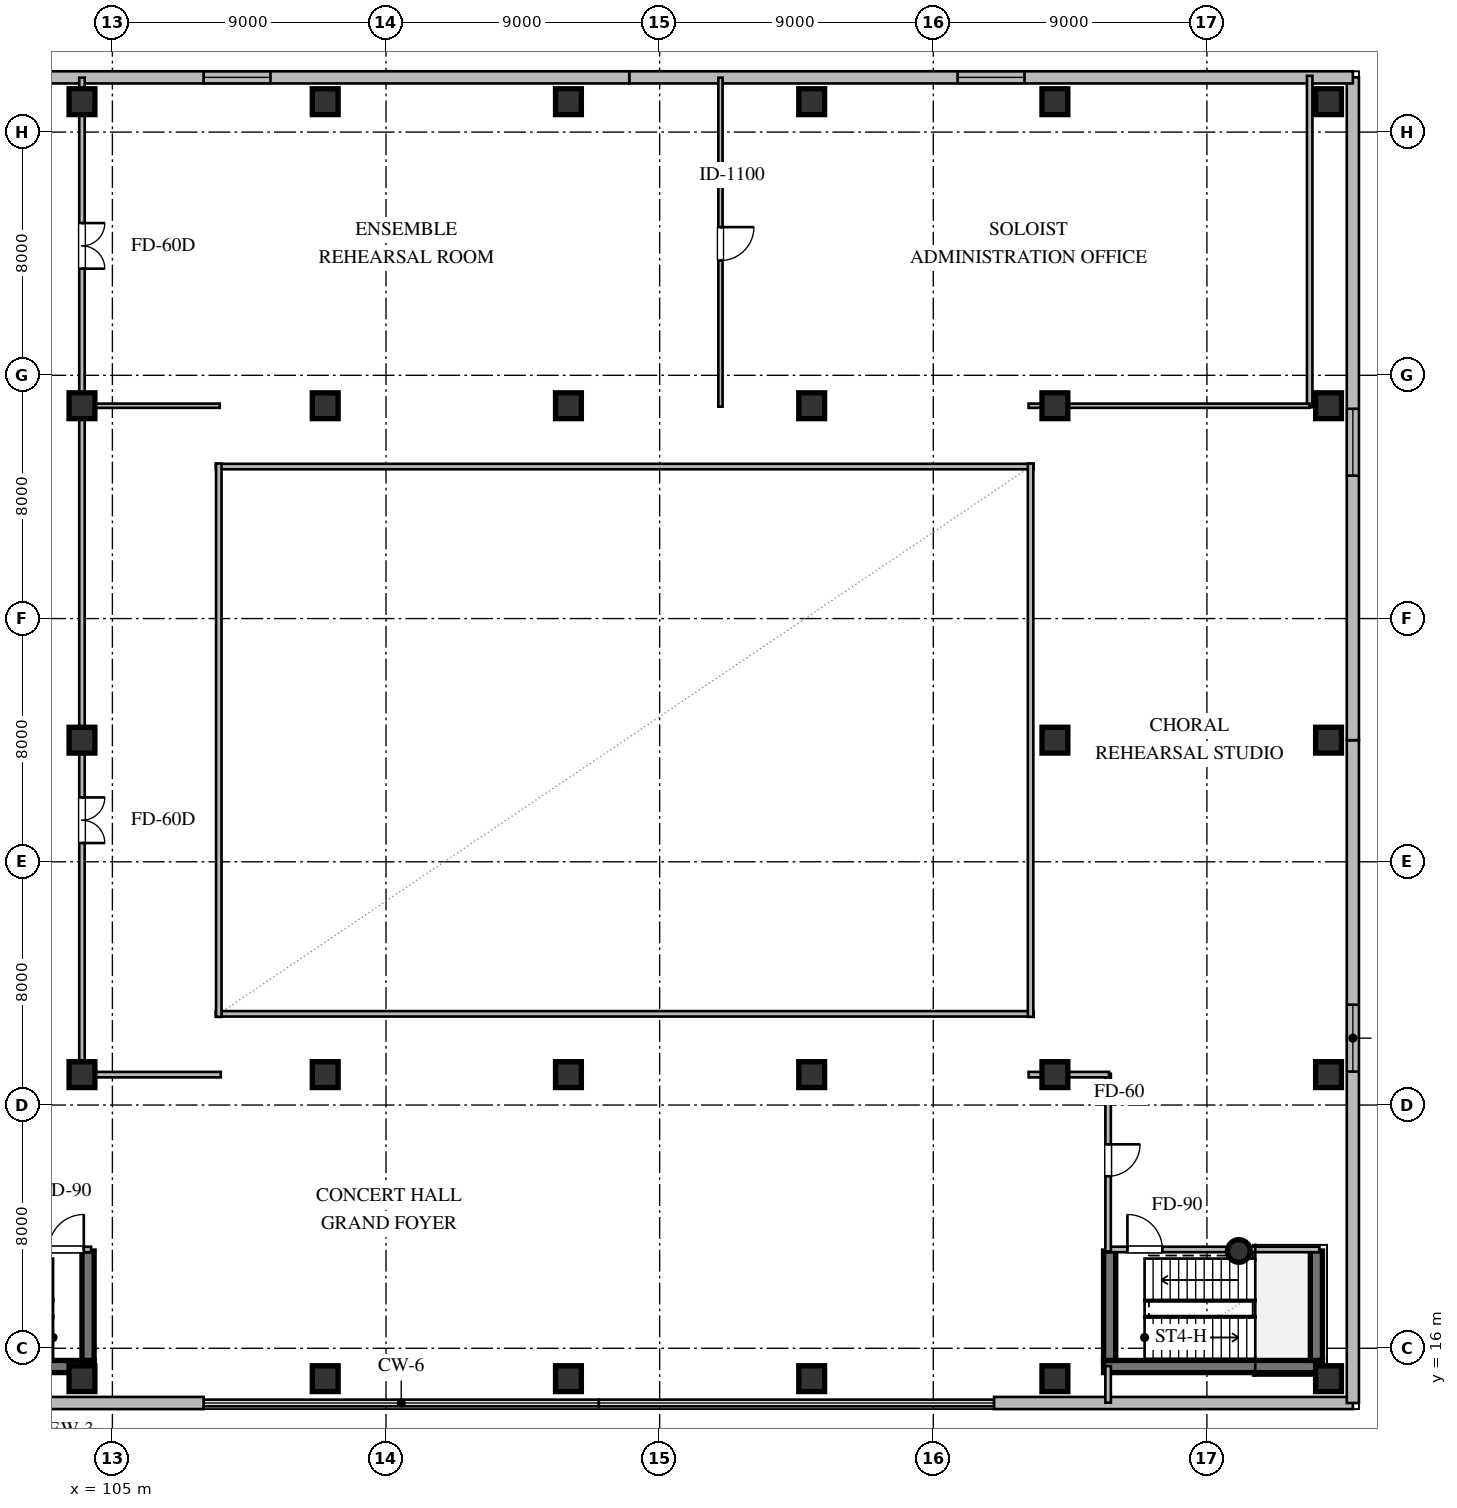
"""IFC4 building model, lengths in metres.
Left out: names, types, materials, properties, quantities, classifications, styles, units other than length and angle.
Written with IfcOpenShell. Run it as: python <this file> out.ifc"""

import sys

from ifc_helpers import new_model, si_unit, direction, frame, frame_2d, origin, origin_2d, place, context, subcontext, project, spatial, rectangle, circle, extrude, element, fill, save


model = new_model("IFC4")
c1 = context("Model", 3, precision=1e-05, world=origin(), true_north=direction((0.0, 1.0)))
c2 = subcontext(c1, "Body", "Model", "MODEL_VIEW")
j1 = project(units=[si_unit("LENGTHUNIT", "METRE"), si_unit("PLANEANGLEUNIT", "RADIAN")], contexts=[c1])
p1 = place(None, origin())
s1 = spatial("IfcSite", under=j1, at=p1, CompositionType="ELEMENT")
p2 = place(p1, origin())
s2 = spatial("IfcBuilding", under=s1, at=p2, CompositionType="ELEMENT")
p3 = place(p2, frame((0.0, 0.0, 4.8)))
s3 = spatial("IfcBuildingStorey", under=s2, at=p3, CompositionType="ELEMENT", Elevation=4.8)
for number, where, z_axis, x_axis in (
    (1, (104.0, 15.0, 0.0), (0.0, 0.0, 1.0), (1.0, 0.0, 0.0)),
    (2, (104.0, 25.0, 0.0), (0.0, 0.0, 1.0), (1.0, 0.0, 0.0)),
    (3, (104.0, 36.0, 0.0), (0.0, 0.0, 1.0), (1.0, 0.0, 0.0)),
    (4, (104.0, 47.0, 0.0), (0.0, 0.0, 1.0), (1.0, 0.0, 0.0)),
    (5, (104.0, 57.0, 0.0), (0.0, 0.0, 1.0), (1.0, 0.0, 0.0)),
    (6, (112.0, 15.0, 0.0), (0.0, 0.0, 1.0), (1.0, 0.0, 0.0)),
    (7, (112.0, 25.0, 0.0), (0.0, 0.0, 1.0), (1.0, 0.0, 0.0)),
    (8, (112.0, 47.0, 0.0), (0.0, 0.0, 1.0), (1.0, 0.0, 0.0)),
    (9, (112.0, 57.0, 0.0), (0.0, 0.0, 1.0), (1.0, 0.0, 0.0)),
    (10, (120.0, 15.0, 0.0), (0.0, 0.0, 1.0), (1.0, 0.0, 0.0)),
    (11, (120.0, 25.0, 0.0), (0.0, 0.0, 1.0), (1.0, 0.0, 0.0)),
    (12, (120.0, 47.0, 0.0), (0.0, 0.0, 1.0), (1.0, 0.0, 0.0)),
    (13, (120.0, 57.0, 0.0), (0.0, 0.0, 1.0), (1.0, 0.0, 0.0)),
    (14, (128.0, 15.0, 0.0), (0.0, 0.0, 1.0), (1.0, 0.0, 0.0)),
    (15, (128.0, 25.0, 0.0), (0.0, 0.0, 1.0), (1.0, 0.0, 0.0)),
    (16, (128.0, 47.0, 0.0), (0.0, 0.0, 1.0), (1.0, 0.0, 0.0)),
    (17, (128.0, 57.0, 0.0), (0.0, 0.0, 1.0), (1.0, 0.0, 0.0)),
    (18, (136.0, 15.0, 0.0), (0.0, 0.0, 1.0), (1.0, 0.0, 0.0)),
    (19, (136.0, 25.0, 0.0), (0.0, 0.0, 1.0), (1.0, 0.0, 0.0)),
    (20, (136.0, 36.0, 0.0), (0.0, 0.0, 1.0), (1.0, 0.0, 0.0)),
    (21, (136.0, 47.0, 0.0), (0.0, 0.0, 1.0), (1.0, 0.0, 0.0)),
    (22, (136.0, 57.0, 0.0), (0.0, 0.0, 1.0), (1.0, 0.0, 0.0)),
    (23, (145.0, 15.0, 0.0), (0.0, 0.0, 1.0), (1.0, 0.0, 0.0)),
    (24, (145.0, 25.0, 0.0), (0.0, 0.0, 1.0), (1.0, 0.0, 0.0)),
    (25, (145.0, 36.0, 0.0), (0.0, 0.0, 1.0), (1.0, 0.0, 0.0)),
    (26, (145.0, 47.0, 0.0), (0.0, 0.0, 1.0), (1.0, 0.0, 0.0)),
    (27, (145.0, 57.0, 0.0), (0.0, 0.0, 1.0), (1.0, 0.0, 0.0)),
):
    element("IfcColumn", number, at=place(p3, frame(where, z_axis=z_axis, x_axis=x_axis)), inside=s3, PredefinedType="COLUMN", context=c2, shape_type="SweptSolid", body=[
        extrude(rectangle(XDim=0.85, YDim=0.85, at=origin_2d()), origin(), (0.0, 0.0, 1.0), 4.8),
    ])
p4 = place(p3, frame((97.2, 15.4, 0.0), z_axis=(0.0, 0.0, 1.0), x_axis=(1.0, 0.0, 0.0)))
e28 = element("IfcWall", 28, at=p4, inside=s3, PredefinedType="SHEAR", context=c2, shape_type="SweptSolid", body=[
    extrude(rectangle(XDim=7.2, YDim=0.4, at=frame_2d((3.6, 0.0))), origin(), (0.0, 0.0, 1.0), 4.52),
])
p5 = place(p3, frame((104.2, 15.6, 0.0), z_axis=(0.0, 0.0, 1.0), x_axis=(0.0, 1.0, 0.0)))
e29 = element("IfcWall", 29, at=p5, inside=s3, PredefinedType="SHEAR", context=c2, shape_type="SweptSolid", body=[
    extrude(rectangle(XDim=3.6, YDim=0.4, at=frame_2d((1.8, 0.0))), origin(), (0.0, 0.0, 1.0), 4.52),
])
p6 = place(p3, frame((137.6, 15.4, 0.0), z_axis=(0.0, 0.0, 1.0), x_axis=(1.0, 0.0, 0.0)))
e30 = element("IfcWall", 30, at=p6, inside=s3, PredefinedType="SHEAR", context=c2, shape_type="SweptSolid", body=[
    extrude(rectangle(XDim=7.2, YDim=0.4, at=frame_2d((3.6, 0.0))), origin(), (0.0, 0.0, 1.0), 4.52),
])
for number, where, z_axis, x_axis in (
    (31, (137.8, 15.6, 0.0), (0.0, 0.0, 1.0), (0.0, 1.0, 0.0)),
    (32, (144.6, 15.6, 0.0), (0.0, 0.0, 1.0), (0.0, 1.0, 0.0)),
):
    element("IfcWall", number, at=place(p3, frame(where, z_axis=z_axis, x_axis=x_axis)), inside=s3, PredefinedType="SHEAR", context=c2, shape_type="SweptSolid", body=[
        extrude(rectangle(XDim=3.6, YDim=0.4, at=frame_2d((1.8, 0.0))), origin(), (0.0, 0.0, 1.0), 4.52),
    ])
p7 = place(p3, frame((142.05, 19.2, 0.0), z_axis=(0.0, 0.0, 1.0), x_axis=(1.0, 0.0, 0.0)))
e33 = element("IfcColumn", 33, at=p7, inside=s3, PredefinedType="COLUMN", context=c2, shape_type="SweptSolid", body=[
    extrude(circle(Radius=0.375, at=origin_2d()), origin(), (0.0, 0.0, 1.0), 4.8),
])
for number, where, z_axis, x_axis in (
    (34, (96.2, 14.2, 0.0), (0.0, 0.0, 1.0), (1.0, 0.0, 0.0)),
    (35, (134.0, 14.2, 0.0), (0.0, 0.0, 1.0), (1.0, 0.0, 0.0)),
):
    element("IfcWall", number, at=place(p3, frame(where, z_axis=z_axis, x_axis=x_axis)), inside=s3, PredefinedType="STANDARD", context=c2, shape_type="SweptSolid", body=[
        extrude(rectangle(XDim=11.8, YDim=0.4, at=frame_2d((5.9, 0.0))), origin(), (0.0, 0.0, 1.0), 4.52),
    ])
p8 = place(p3, frame((145.8, 14.2, 0.0), z_axis=(0.0, 0.0, 1.0), x_axis=(0.0, 1.0, 0.0)))
e36 = element("IfcWall", 36, at=p8, inside=s3, PredefinedType="STANDARD", context=c2, shape_type="SweptSolid", body=[
    extrude(rectangle(XDim=21.8, YDim=0.4, at=frame_2d((10.9, 0.0))), origin(), (0.0, 0.0, 1.0), 4.52),
])
p9 = place(p8, frame((10.9, 0.0, 1.25)))
e37 = element("IfcOpeningElement", 37, at=p9, cuts=e36, PredefinedType="OPENING", context=c2, shape_type="SweptSolid", body=[
    extrude(rectangle(XDim=2.2, YDim=1.5, at=frame_2d((1.1, 0.75))), frame((0.0, 0.21, 0.0), z_axis=(0.0, -1.0, 0.0), x_axis=(1.0, 0.0, 0.0)), (0.0, 0.0, 1.0), 0.42),
])
p10 = place(p3, frame((145.8, 36.0, 0.0), z_axis=(0.0, 0.0, 1.0), x_axis=(0.0, 1.0, 0.0)))
e38 = element("IfcWall", 38, at=p10, inside=s3, PredefinedType="STANDARD", context=c2, shape_type="SweptSolid", body=[
    extrude(rectangle(XDim=21.8, YDim=0.4, at=frame_2d((10.9, 0.0))), origin(), (0.0, 0.0, 1.0), 4.52),
])
p11 = place(p10, frame((8.7, 0.0, 1.25)))
e39 = element("IfcOpeningElement", 39, at=p11, cuts=e38, PredefinedType="OPENING", context=c2, shape_type="SweptSolid", body=[
    extrude(rectangle(XDim=2.2, YDim=1.5, at=frame_2d((1.1, 0.75))), frame((0.0, 0.21, 0.0), z_axis=(0.0, -1.0, 0.0), x_axis=(1.0, 0.0, 0.0)), (0.0, 0.0, 1.0), 0.42),
])
p12 = place(p3, frame((145.8, 57.8, 0.0), z_axis=(0.0, 0.0, 1.0), x_axis=(-1.0, 0.0, 0.0)))
e40 = element("IfcWall", 40, at=p12, inside=s3, PredefinedType="STANDARD", context=c2, shape_type="SweptSolid", body=[
    extrude(rectangle(XDim=23.8, YDim=0.4, at=frame_2d((11.9, 0.0))), origin(), (0.0, 0.0, 1.0), 4.52),
])
p13 = place(p12, frame((10.8, 0.0, 1.25)))
e41 = element("IfcOpeningElement", 41, at=p13, cuts=e40, PredefinedType="OPENING", context=c2, shape_type="SweptSolid", body=[
    extrude(rectangle(XDim=2.2, YDim=1.5, at=frame_2d((1.1, 0.75))), frame((0.0, 0.21, 0.0), z_axis=(0.0, -1.0, 0.0), x_axis=(1.0, 0.0, 0.0)), (0.0, 0.0, 1.0), 0.42),
])
p14 = place(p3, frame((122.0, 57.8, 0.0), z_axis=(0.0, 0.0, 1.0), x_axis=(-1.0, 0.0, 0.0)))
e42 = element("IfcWall", 42, at=p14, inside=s3, PredefinedType="STANDARD", context=c2, shape_type="SweptSolid", body=[
    extrude(rectangle(XDim=25.8, YDim=0.4, at=frame_2d((12.9, 0.0))), origin(), (0.0, 0.0, 1.0), 4.52),
])
p15 = place(p14, frame((11.8, 0.0, 1.25)))
e43 = element("IfcOpeningElement", 43, at=p15, cuts=e42, PredefinedType="OPENING", context=c2, shape_type="SweptSolid", body=[
    extrude(rectangle(XDim=2.2, YDim=1.5, at=frame_2d((1.1, 0.75))), frame((0.0, 0.21, 0.0), z_axis=(0.0, -1.0, 0.0), x_axis=(1.0, 0.0, 0.0)), (0.0, 0.0, 1.0), 0.42),
])
p16 = place(p3, frame((97.3, 19.25, 0.0), z_axis=(0.0, 0.0, 1.0), x_axis=(1.0, 0.0, 0.0)))
e44 = element("IfcWall", 44, at=p16, inside=s3, PredefinedType="PARTITIONING", context=c2, shape_type="SweptSolid", body=[
    extrude(rectangle(XDim=7.0, YDim=0.18, at=frame_2d((3.5, 0.0))), origin(), (0.0, 0.0, 1.0), 4.52),
])
p17 = place(p16, frame((5.61, 0.0, 0.0)))
e45 = element("IfcOpeningElement", 45, at=p17, cuts=e44, PredefinedType="OPENING", context=c2, shape_type="SweptSolid", body=[
    extrude(rectangle(XDim=1.15, YDim=2.1, at=frame_2d((0.575, 1.05))), frame((0.0, 0.1, 0.0), z_axis=(0.0, -1.0, 0.0), x_axis=(1.0, 0.0, 0.0)), (0.0, 0.0, 1.0), 0.2),
])
p18 = place(p3, frame((137.7, 19.25, 0.0), z_axis=(0.0, 0.0, 1.0), x_axis=(1.0, 0.0, 0.0)))
e46 = element("IfcWall", 46, at=p18, inside=s3, PredefinedType="PARTITIONING", context=c2, shape_type="SweptSolid", body=[
    extrude(rectangle(XDim=7.0, YDim=0.18, at=frame_2d((3.5, 0.0))), origin(), (0.0, 0.0, 1.0), 4.52),
])
p19 = place(p18, frame((0.685, 0.0, 0.0)))
e47 = element("IfcOpeningElement", 47, at=p19, cuts=e46, PredefinedType="OPENING", context=c2, shape_type="SweptSolid", body=[
    extrude(rectangle(XDim=1.15, YDim=2.1, at=frame_2d((0.575, 1.05))), frame((0.0, 0.1, 0.0), z_axis=(0.0, -1.0, 0.0), x_axis=(1.0, 0.0, 0.0)), (0.0, 0.0, 1.0), 0.2),
])
for number, where, z_axis, x_axis in (
    (48, (108.4, 27.0, 0.0), (0.0, 0.0, 1.0), (1.0, 0.0, 0.0)),
    (49, (108.4, 45.0, 0.0), (0.0, 0.0, 1.0), (1.0, 0.0, 0.0)),
):
    element("IfcWall", number, at=place(p3, frame(where, z_axis=z_axis, x_axis=x_axis)), inside=s3, PredefinedType="PARTITIONING", context=c2, shape_type="SweptSolid", body=[
        extrude(rectangle(XDim=26.9, YDim=0.18, at=frame_2d((13.45, 0.0))), origin(), (0.0, 0.0, 1.0), 4.52),
    ])
for number, where, z_axis, x_axis in (
    (50, (108.5, 26.9, 0.0), (0.0, 0.0, 1.0), (0.0, 1.0, 0.0)),
    (51, (135.2, 26.9, 0.0), (0.0, 0.0, 1.0), (0.0, 1.0, 0.0)),
):
    element("IfcWall", number, at=place(p3, frame(where, z_axis=z_axis, x_axis=x_axis)), inside=s3, PredefinedType="PARTITIONING", context=c2, shape_type="SweptSolid", body=[
        extrude(rectangle(XDim=18.2, YDim=0.18, at=frame_2d((9.1, 0.0))), origin(), (0.0, 0.0, 1.0), 4.52),
    ])
p20 = place(p3, frame((144.38, 46.95, 0.0), z_axis=(0.0, 0.0, 1.0), x_axis=(0.0, 1.0, 0.0)))
e52 = element("IfcWall", 52, at=p20, inside=s3, PredefinedType="PARTITIONING", context=c2, shape_type="SweptSolid", body=[
    extrude(rectangle(XDim=10.9, YDim=0.18, at=frame_2d((5.45, 0.0))), origin(), (0.0, 0.0, 1.0), 4.093),
])
p21 = place(p3, frame((104.0, 47.065, 0.0), z_axis=(0.0, 0.0, 1.0), x_axis=(0.0, -1.0, 0.0)))
e53 = element("IfcWall", 53, at=p21, inside=s3, PredefinedType="PARTITIONING", context=c2, shape_type="SweptSolid", body=[
    extrude(rectangle(XDim=22.095, YDim=0.18, at=frame_2d((11.047, 0.0))), origin(), (0.0, 0.0, 1.0), 4.093),
])
p22 = place(p21, frame((12.948, 0.0, 0.0)))
e54 = element("IfcOpeningElement", 54, at=p22, cuts=e53, PredefinedType="OPENING", context=c2, shape_type="SweptSolid", body=[
    extrude(rectangle(XDim=1.5, YDim=2.15, at=frame_2d((0.75, 1.075))), frame((0.0, 0.1, 0.0), z_axis=(0.0, -1.0, 0.0), x_axis=(1.0, 0.0, 0.0)), (0.0, 0.0, 1.0), 0.2),
])
p23 = place(p3, frame((103.97, 25.0, 0.0), z_axis=(0.0, 0.0, 1.0), x_axis=(1.0, 0.0, 0.0)))
e55 = element("IfcWall", 55, at=p23, inside=s3, PredefinedType="PARTITIONING", context=c2, shape_type="SweptSolid", body=[
    extrude(rectangle(XDim=4.595, YDim=0.18, at=frame_2d((2.297, 0.0))), origin(), (0.0, 0.0, 1.0), 3.899),
])
p24 = place(p3, frame((104.0, 57.79, 0.0), z_axis=(0.0, 0.0, 1.0), x_axis=(0.0, -1.0, 0.0)))
e56 = element("IfcWall", 56, at=p24, inside=s3, PredefinedType="PARTITIONING", context=c2, shape_type="SweptSolid", body=[
    extrude(rectangle(XDim=10.855, YDim=0.18, at=frame_2d((5.427, 0.0))), origin(), (0.0, 0.0, 1.0), 4.093),
])
p25 = place(p24, frame((4.782, 0.0, 0.0)))
e57 = element("IfcOpeningElement", 57, at=p25, cuts=e56, PredefinedType="OPENING", context=c2, shape_type="SweptSolid", body=[
    extrude(rectangle(XDim=1.5, YDim=2.15, at=frame_2d((0.75, 1.075))), frame((0.0, 0.1, 0.0), z_axis=(0.0, -1.0, 0.0), x_axis=(1.0, 0.0, 0.0)), (0.0, 0.0, 1.0), 0.2),
])
p26 = place(p3, frame((137.75, 25.03, 0.0), z_axis=(0.0, 0.0, 1.0), x_axis=(0.0, -1.0, 0.0)))
e58 = element("IfcWall", 58, at=p26, inside=s3, PredefinedType="PARTITIONING", context=c2, shape_type="SweptSolid", body=[
    extrude(rectangle(XDim=5.845, YDim=0.18, at=frame_2d((2.922, 0.0))), origin(), (0.0, 0.0, 1.0), 4.52),
])
p27 = place(p26, frame((2.322, 0.0, 0.0)))
e59 = element("IfcOpeningElement", 59, at=p27, cuts=e58, PredefinedType="OPENING", context=c2, shape_type="SweptSolid", body=[
    extrude(rectangle(XDim=1.05, YDim=2.1, at=frame_2d((0.525, 1.05))), frame((0.0, 0.1, 0.0), z_axis=(0.0, -1.0, 0.0), x_axis=(1.0, 0.0, 0.0)), (0.0, 0.0, 1.0), 0.2),
])
p28 = place(p3, frame((135.135, 25.0, 0.0), z_axis=(0.0, 0.0, 1.0), x_axis=(1.0, 0.0, 0.0)))
e60 = element("IfcWall", 60, at=p28, inside=s3, PredefinedType="PARTITIONING", context=c2, shape_type="SweptSolid", body=[
    extrude(rectangle(XDim=2.645, YDim=0.18, at=frame_2d((1.323, 0.0))), origin(), (0.0, 0.0, 1.0), 3.899),
])
p29 = place(p3, frame((137.75, 15.415, 0.0), z_axis=(0.0, 0.0, 1.0), x_axis=(0.0, -1.0, 0.0)))
e61 = element("IfcWall", 61, at=p29, inside=s3, PredefinedType="PARTITIONING", context=c2, shape_type="SweptSolid", body=[
    extrude(rectangle(XDim=1.205, YDim=0.18, at=frame_2d((0.603, 0.0))), origin(), (0.0, 0.0, 1.0), 4.52),
])
p30 = place(p3, frame((103.97, 47.0, 0.0), z_axis=(0.0, 0.0, 1.0), x_axis=(1.0, 0.0, 0.0)))
e62 = element("IfcWall", 62, at=p30, inside=s3, PredefinedType="PARTITIONING", context=c2, shape_type="SweptSolid", body=[
    extrude(rectangle(XDim=4.56, YDim=0.14, at=frame_2d((2.28, 0.0))), origin(), (0.0, 0.0, 1.0), 3.899),
])
p31 = place(p3, frame((125.0, 57.79, 0.0), z_axis=(0.0, 0.0, 1.0), x_axis=(0.0, -1.0, 0.0)))
e63 = element("IfcWall", 63, at=p31, inside=s3, PredefinedType="PARTITIONING", context=c2, shape_type="SweptSolid", body=[
    extrude(rectangle(XDim=10.82, YDim=0.14, at=frame_2d((5.41, 0.0))), origin(), (0.0, 0.0, 1.0), 4.52),
])
p32 = place(p31, frame((4.915, 0.0, 0.0)))
e64 = element("IfcOpeningElement", 64, at=p32, cuts=e63, PredefinedType="OPENING", context=c2, shape_type="SweptSolid", body=[
    extrude(rectangle(XDim=1.1, YDim=2.1, at=frame_2d((0.55, 1.05))), frame((0.0, 0.08, 0.0), z_axis=(0.0, -1.0, 0.0), x_axis=(1.0, 0.0, 0.0)), (0.0, 0.0, 1.0), 0.16),
])
p33 = place(p3, frame((144.38, 47.0, 0.0), z_axis=(0.0, 0.0, 1.0), x_axis=(-1.0, 0.0, 0.0)))
e65 = element("IfcWall", 65, at=p33, inside=s3, PredefinedType="PARTITIONING", context=c2, shape_type="SweptSolid", body=[
    extrude(rectangle(XDim=9.245, YDim=0.14, at=frame_2d((4.623, 0.0))), origin(), (0.0, 0.0, 1.0), 3.899),
])
p34 = place(p9, origin())
e66 = element("IfcWindow", 66, at=p34, inside=s3, PartitioningType="SINGLE_PANEL", PredefinedType="WINDOW", context=c2, shape_type="SweptSolid", body=[
    extrude(rectangle(XDim=2.2, YDim=1.5, at=frame_2d((1.1, 0.75))), frame((0.0, 0.03, 0.0), z_axis=(0.0, -1.0, 0.0), x_axis=(1.0, 0.0, 0.0)), (0.0, 0.0, 1.0), 0.06),
])
fill(e37, e66)
p35 = place(p11, origin())
e67 = element("IfcWindow", 67, at=p35, inside=s3, PartitioningType="SINGLE_PANEL", PredefinedType="WINDOW", context=c2, shape_type="SweptSolid", body=[
    extrude(rectangle(XDim=2.2, YDim=1.5, at=frame_2d((1.1, 0.75))), frame((0.0, 0.03, 0.0), z_axis=(0.0, -1.0, 0.0), x_axis=(1.0, 0.0, 0.0)), (0.0, 0.0, 1.0), 0.06),
])
fill(e39, e67)
p36 = place(p13, origin())
e68 = element("IfcWindow", 68, at=p36, inside=s3, PartitioningType="SINGLE_PANEL", PredefinedType="WINDOW", context=c2, shape_type="SweptSolid", body=[
    extrude(rectangle(XDim=2.2, YDim=1.5, at=frame_2d((1.1, 0.75))), frame((0.0, 0.03, 0.0), z_axis=(0.0, -1.0, 0.0), x_axis=(1.0, 0.0, 0.0)), (0.0, 0.0, 1.0), 0.06),
])
fill(e41, e68)
p37 = place(p15, origin())
e69 = element("IfcWindow", 69, at=p37, inside=s3, PartitioningType="SINGLE_PANEL", PredefinedType="WINDOW", context=c2, shape_type="SweptSolid", body=[
    extrude(rectangle(XDim=2.2, YDim=1.5, at=frame_2d((1.1, 0.75))), frame((0.0, 0.03, 0.0), z_axis=(0.0, -1.0, 0.0), x_axis=(1.0, 0.0, 0.0)), (0.0, 0.0, 1.0), 0.06),
])
fill(e43, e69)
p38 = place(p17, origin())
e70 = element("IfcDoor", 70, at=p38, inside=s3, OperationType="SINGLE_SWING_RIGHT", PredefinedType="DOOR", context=c2, shape_type="SweptSolid", body=[
    extrude(rectangle(XDim=1.15, YDim=2.1, at=frame_2d((0.575, 1.05))), frame((0.0, 0.025, 0.0), z_axis=(0.0, -1.0, 0.0), x_axis=(1.0, 0.0, 0.0)), (0.0, 0.0, 1.0), 0.05),
])
fill(e45, e70)
p39 = place(p19, origin())
e71 = element("IfcDoor", 71, at=p39, inside=s3, OperationType="SINGLE_SWING_LEFT", PredefinedType="DOOR", context=c2, shape_type="SweptSolid", body=[
    extrude(rectangle(XDim=1.15, YDim=2.1, at=frame_2d((0.575, 1.05))), frame((0.0, 0.025, 0.0), z_axis=(0.0, -1.0, 0.0), x_axis=(1.0, 0.0, 0.0)), (0.0, 0.0, 1.0), 0.05),
])
fill(e47, e71)
p40 = place(p22, origin())
e72 = element("IfcDoor", 72, at=p40, inside=s3, OperationType="DOUBLE_DOOR_SINGLE_SWING", PredefinedType="DOOR", context=c2, shape_type="SweptSolid", body=[
    extrude(rectangle(XDim=1.5, YDim=2.15, at=frame_2d((0.75, 1.075))), frame((0.0, 0.025, 0.0), z_axis=(0.0, -1.0, 0.0), x_axis=(1.0, 0.0, 0.0)), (0.0, 0.0, 1.0), 0.05),
])
fill(e54, e72)
p41 = place(p25, origin())
e73 = element("IfcDoor", 73, at=p41, inside=s3, OperationType="DOUBLE_DOOR_SINGLE_SWING", PredefinedType="DOOR", context=c2, shape_type="SweptSolid", body=[
    extrude(rectangle(XDim=1.5, YDim=2.15, at=frame_2d((0.75, 1.075))), frame((0.0, 0.025, 0.0), z_axis=(0.0, -1.0, 0.0), x_axis=(1.0, 0.0, 0.0)), (0.0, 0.0, 1.0), 0.05),
])
fill(e57, e73)
p42 = place(p27, origin())
e74 = element("IfcDoor", 74, at=p42, inside=s3, OperationType="SINGLE_SWING_LEFT", PredefinedType="DOOR", context=c2, shape_type="SweptSolid", body=[
    extrude(rectangle(XDim=1.05, YDim=2.1, at=frame_2d((0.525, 1.05))), frame((0.0, 0.025, 0.0), z_axis=(0.0, -1.0, 0.0), x_axis=(1.0, 0.0, 0.0)), (0.0, 0.0, 1.0), 0.05),
])
fill(e59, e74)
p43 = place(p32, origin())
e75 = element("IfcDoor", 75, at=p43, inside=s3, OperationType="SINGLE_SWING_LEFT", PredefinedType="DOOR", context=c2, shape_type="SweptSolid", body=[
    extrude(rectangle(XDim=1.1, YDim=2.1, at=frame_2d((0.55, 1.05))), frame((0.0, 0.025, 0.0), z_axis=(0.0, -1.0, 0.0), x_axis=(1.0, 0.0, 0.0)), (0.0, 0.0, 1.0), 0.05),
])
fill(e64, e75)
save(model, sys.argv[1])
